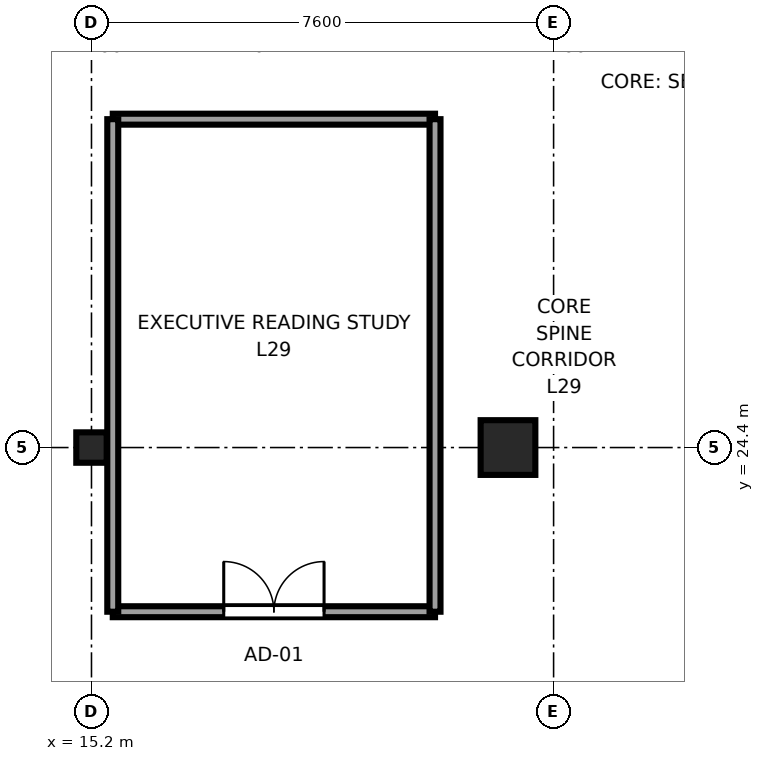
"""IFC4 building model, lengths in metres.
Left out: names, types, materials, properties, quantities, classifications, styles, units other than length and angle.
Written with IfcOpenShell. Run it as: python <this file> out.ifc"""

import sys

from ifc_helpers import new_model, si_unit, direction, frame, frame_2d, origin, origin_2d, place, context, subcontext, project, spatial, rectangle, i_section, extrude, source, transform, mapped, element, fill, save


model = new_model("IFC4")
c1 = context("Model", 3, precision=1e-05, world=origin(), true_north=direction((0.0, 1.0)))
c2 = subcontext(c1, "Body", "Model", "MODEL_VIEW")
j1 = project(units=[si_unit("LENGTHUNIT", "METRE"), si_unit("PLANEANGLEUNIT", "RADIAN")], contexts=[c1])
p1 = place(None, origin())
s1 = spatial("IfcSite", under=j1, at=p1, CompositionType="ELEMENT")
p2 = place(p1, origin())
s2 = spatial("IfcBuilding", under=s1, at=p2, CompositionType="ELEMENT")
p3 = place(p2, frame((0.0, 0.0, 115.1)))
s3 = spatial("IfcBuildingStorey", under=s2, at=p3, CompositionType="ELEMENT", Elevation=115.1)
m1 = source(origin(), c2, "Body", "SweptSolid", [
    extrude(i_section(OverallWidth=0.5, OverallDepth=0.5, WebThickness=0.022, FlangeThickness=0.034, at=origin_2d()), origin(), (0.0, 0.0, 1.0), 3.55),
])
p4 = place(p3, frame((15.2, 24.4, 0.0), z_axis=(0.0, 0.0, 1.0), x_axis=(1.0, 0.0, 0.0)))
e1 = element("IfcColumn", 1, at=p4, inside=s3, PredefinedType="COLUMN", context=c2, shape_type="MappedRepresentation", body=[
    mapped(m1, transform((0.0, 0.0, 0.0), x_axis=(1.0, 0.0, 0.0), y_axis=(0.0, 1.0, 0.0), z_axis=(0.0, 0.0, 1.0), scale=1.0)),
])
m2 = source(origin(), c2, "Body", "SweptSolid", [
    extrude(rectangle(XDim=0.9, YDim=0.9, at=origin_2d()), origin(), (0.0, 0.0, 1.0), 3.55),
])
p5 = place(p3, frame((22.05, 24.4, 0.0), z_axis=(0.0, 0.0, 1.0), x_axis=(1.0, 0.0, 0.0)))
e2 = element("IfcColumn", 2, at=p5, inside=s3, PredefinedType="COLUMN", context=c2, shape_type="MappedRepresentation", body=[
    mapped(m2, transform((0.0, 0.0, 0.0), x_axis=(1.0, 0.0, 0.0), y_axis=(0.0, 1.0, 0.0), z_axis=(0.0, 0.0, 1.0), scale=1.0)),
])
p6 = place(p3, frame((15.55, 21.7, 0.0), z_axis=(0.0, 0.0, 1.0), x_axis=(1.0, 0.0, 0.0)))
e3 = element("IfcWall", 3, at=p6, inside=s3, PredefinedType="PARTITIONING", context=c2, shape_type="SweptSolid", body=[
    extrude(rectangle(XDim=5.3, YDim=0.18, at=frame_2d((2.65, 0.0))), origin(), (0.0, 0.0, 1.0), 3.37),
])
p7 = place(p6, frame((1.825, 0.0, 0.0)))
e4 = element("IfcOpeningElement", 4, at=p7, cuts=e3, PredefinedType="OPENING", context=c2, shape_type="SweptSolid", body=[
    extrude(rectangle(XDim=1.65, YDim=2.15, at=frame_2d((0.825, 1.075))), frame((0.0, 0.1, 0.0), z_axis=(0.0, -1.0, 0.0), x_axis=(1.0, 0.0, 0.0)), (0.0, 0.0, 1.0), 0.2),
])
p8 = place(p3, frame((15.55, 29.8, 0.0), z_axis=(0.0, 0.0, 1.0), x_axis=(1.0, 0.0, 0.0)))
e5 = element("IfcWall", 5, at=p8, inside=s3, PredefinedType="PARTITIONING", context=c2, shape_type="SweptSolid", body=[
    extrude(rectangle(XDim=5.3, YDim=0.18, at=frame_2d((2.65, 0.0))), origin(), (0.0, 0.0, 1.0), 3.37),
])
for number, where, z_axis, x_axis in (
    (6, (15.55, 21.7, 0.0), (0.0, 0.0, 1.0), (0.0, 1.0, 0.0)),
    (7, (20.85, 21.7, 0.0), (0.0, 0.0, 1.0), (0.0, 1.0, 0.0)),
):
    element("IfcWall", number, at=place(p3, frame(where, z_axis=z_axis, x_axis=x_axis)), inside=s3, PredefinedType="PARTITIONING", context=c2, shape_type="SweptSolid", body=[
        extrude(rectangle(XDim=8.1, YDim=0.18, at=frame_2d((4.05, 0.0))), origin(), (0.0, 0.0, 1.0), 3.37),
    ])
m3 = source(origin(), c2, "Body", "SweptSolid", [
    extrude(rectangle(XDim=1.65, YDim=2.15, at=frame_2d((0.825, 1.075))), frame((0.0, 0.025, 0.0), z_axis=(0.0, -1.0, 0.0), x_axis=(1.0, 0.0, 0.0)), (0.0, 0.0, 1.0), 0.05),
])
p9 = place(p7, origin())
e8 = element("IfcDoor", 8, at=p9, inside=s3, OperationType="DOUBLE_DOOR_SINGLE_SWING", PredefinedType="DOOR", context=c2, shape_type="MappedRepresentation", body=[
    mapped(m3, transform((0.0, 0.0, 0.0), x_axis=(1.0, 0.0, 0.0), y_axis=(0.0, 1.0, 0.0), z_axis=(0.0, 0.0, 1.0), scale=1.0)),
])
fill(e4, e8)
save(model, sys.argv[1])
